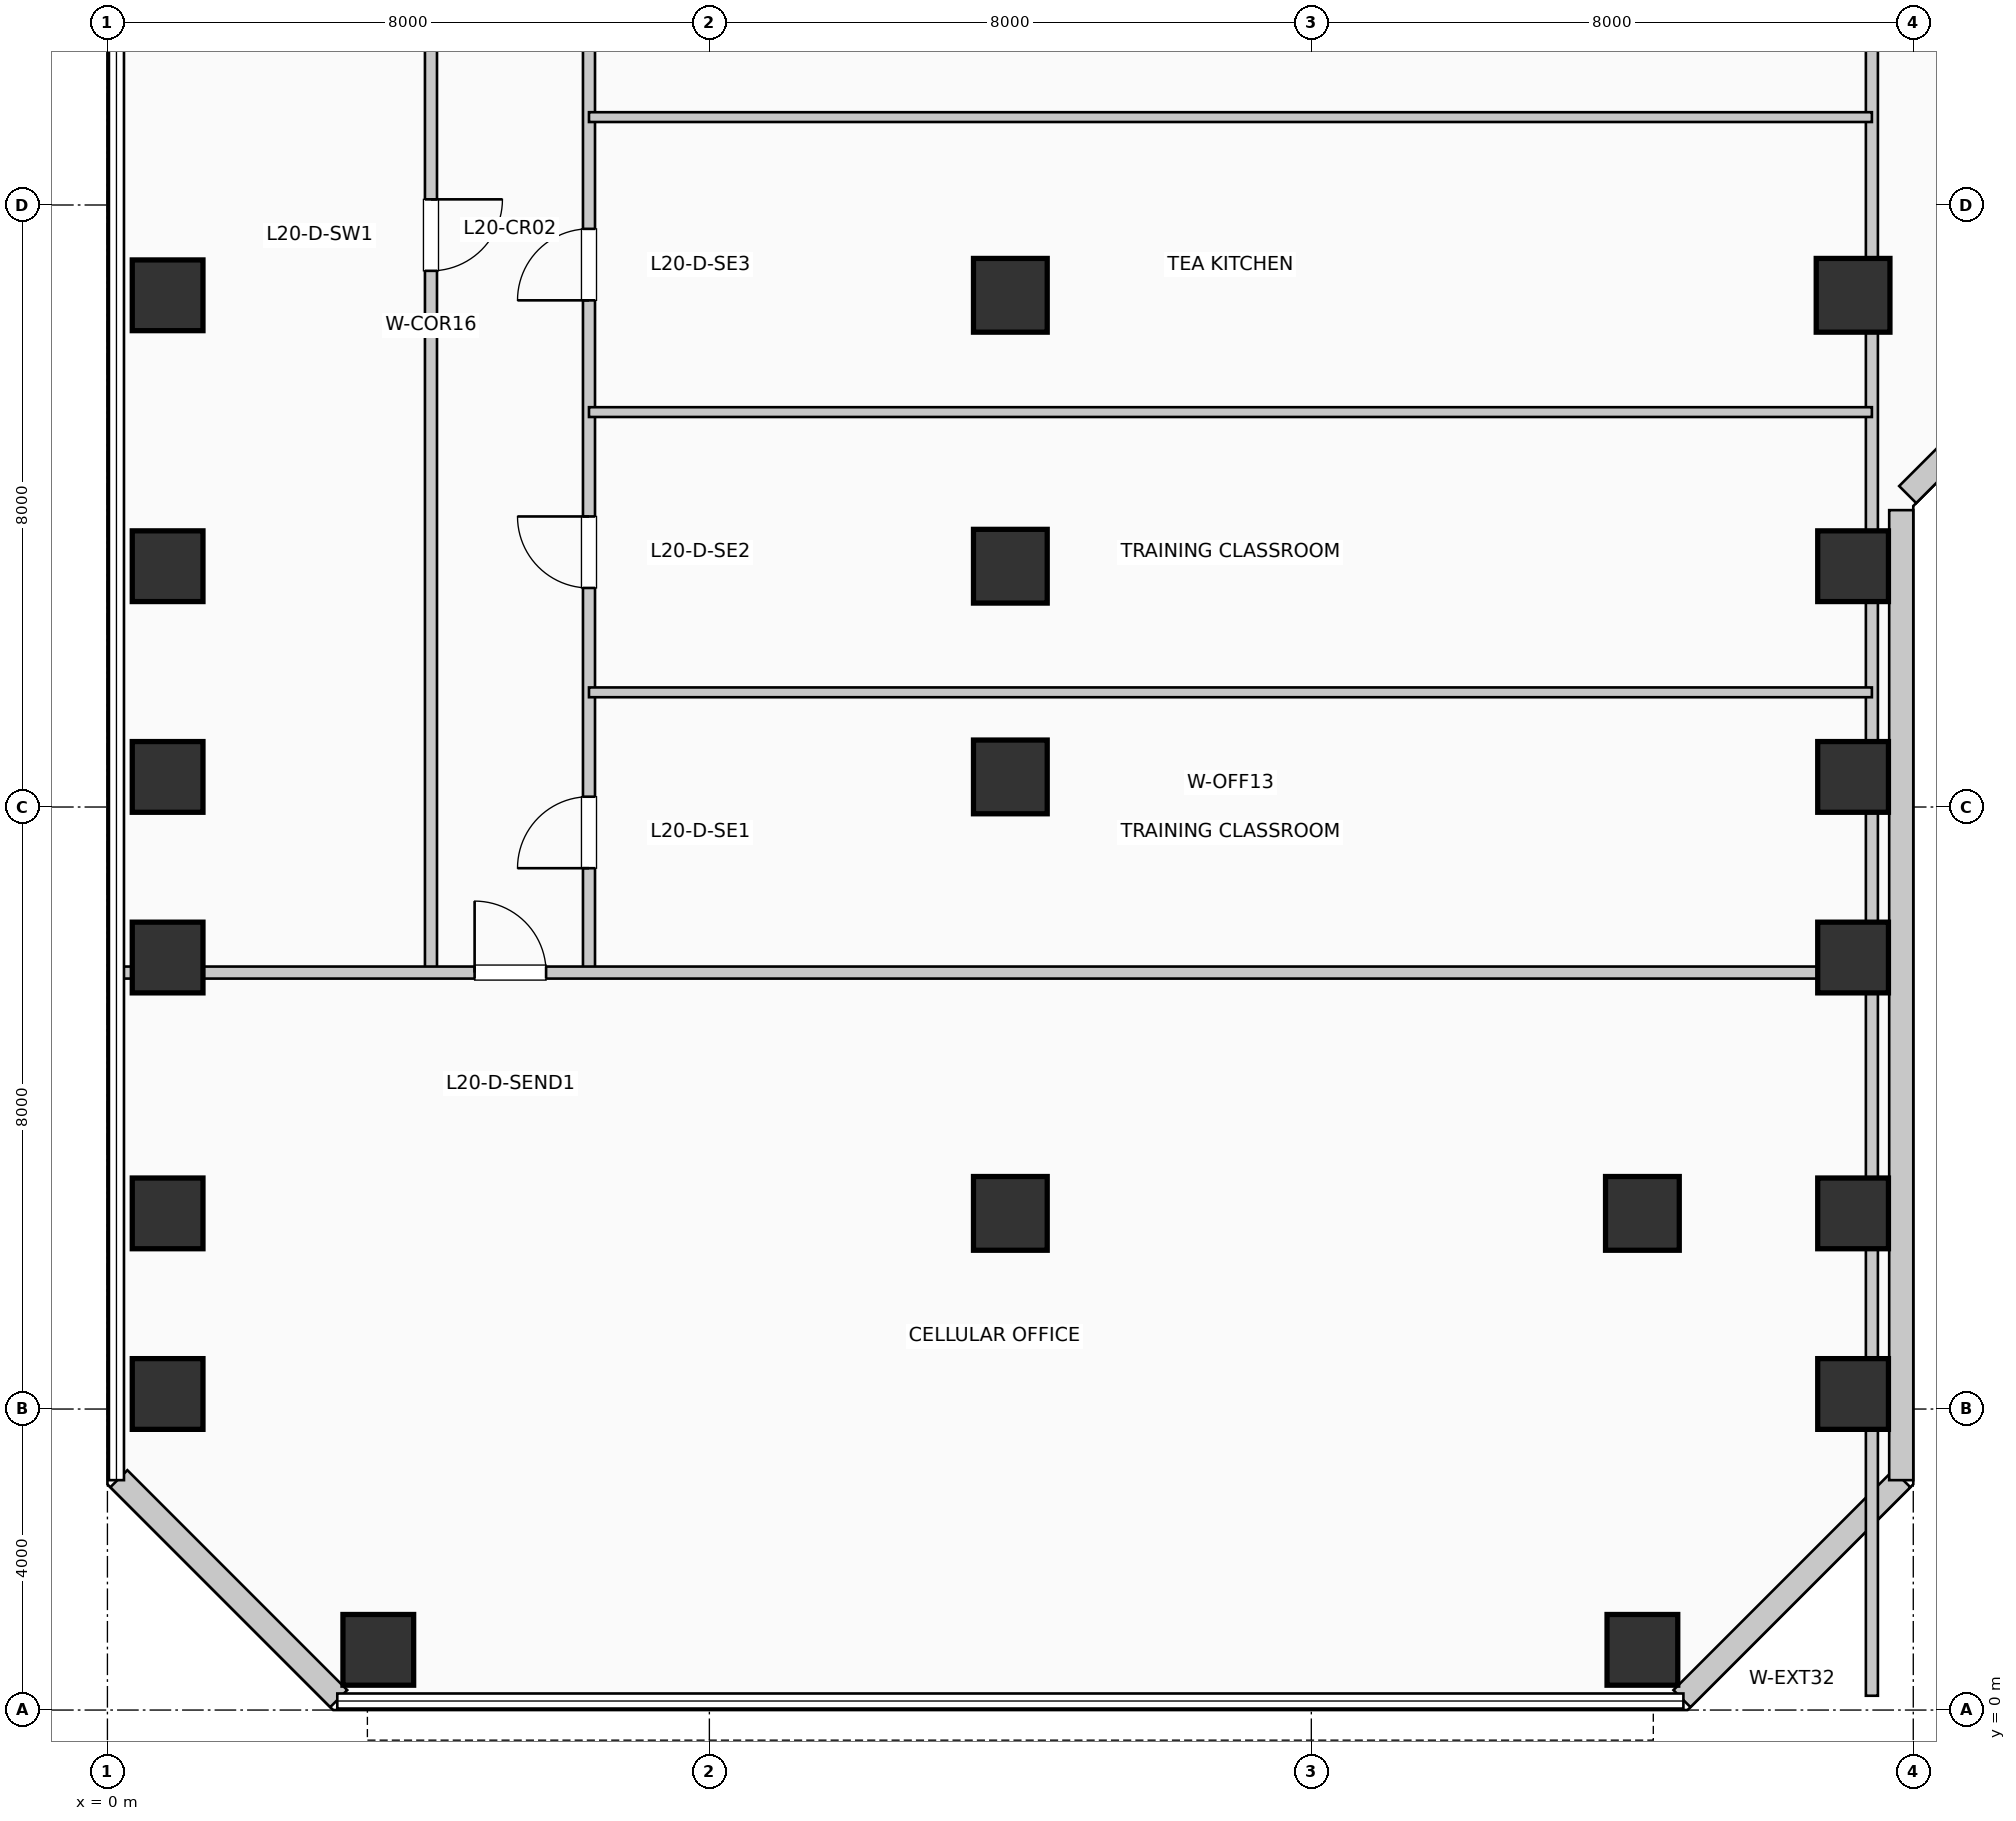
"""IFC4 building model, lengths in metres.
Left out: names, types, materials, properties, quantities, classifications, styles, units other than length and angle.
Written with IfcOpenShell. Run it as: python <this file> out.ifc"""

import sys

from ifc_helpers import new_model, si_unit, direction, frame, frame_2d, origin, origin_2d, place, context, subcontext, project, spatial, rectangle, extrude, element, fill, save


model = new_model("IFC4")
c1 = context("Model", 3, precision=1e-05, world=origin(), true_north=direction((0.0, 1.0)))
c2 = subcontext(c1, "Body", "Model", "MODEL_VIEW")
j1 = project(units=[si_unit("LENGTHUNIT", "METRE"), si_unit("PLANEANGLEUNIT", "RADIAN")], contexts=[c1])
p1 = place(None, origin())
s1 = spatial("IfcSite", under=j1, at=p1, CompositionType="ELEMENT")
p2 = place(p1, origin())
s2 = spatial("IfcBuilding", under=s1, at=p2, CompositionType="ELEMENT")
p3 = place(p2, frame((0.0, 0.0, 85.8)))
s3 = spatial("IfcBuildingStorey", under=s2, at=p3, CompositionType="ELEMENT", Elevation=85.8)
for number, where, z_axis, x_axis in (
    (1, (0.8, 4.2, 0.0), (0.0, 0.0, 1.0), (1.0, 0.0, 0.0)),
    (2, (0.8, 6.6, 0.0), (0.0, 0.0, 1.0), (1.0, 0.0, 0.0)),
    (3, (0.8, 10.0, 0.0), (0.0, 0.0, 1.0), (1.0, 0.0, 0.0)),
    (4, (0.8, 12.4, 0.0), (0.0, 0.0, 1.0), (1.0, 0.0, 0.0)),
    (5, (0.8, 15.2, 0.0), (0.0, 0.0, 1.0), (1.0, 0.0, 0.0)),
    (6, (0.8, 18.8, 0.0), (0.0, 0.0, 1.0), (1.0, 0.0, 0.0)),
    (7, (3.6, 0.8, 0.0), (0.0, 0.0, 1.0), (1.0, 0.0, 0.0)),
):
    element("IfcColumn", number, at=place(p3, frame(where, z_axis=z_axis, x_axis=x_axis)), inside=s3, PredefinedType="COLUMN", context=c2, shape_type="SweptSolid", body=[
        extrude(rectangle(XDim=0.94, YDim=0.94, at=origin_2d()), origin(), (0.0, 0.0, 1.0), 3.96),
    ])
for number, where, z_axis, x_axis in (
    (8, (12.0, 6.6, 0.0), (0.0, 0.0, 1.0), (1.0, 0.0, 0.0)),
    (9, (12.0, 12.4, 0.0), (0.0, 0.0, 1.0), (1.0, 0.0, 0.0)),
    (10, (12.0, 15.2, 0.0), (0.0, 0.0, 1.0), (1.0, 0.0, 0.0)),
    (11, (12.0, 18.8, 0.0), (0.0, 0.0, 1.0), (1.0, 0.0, 0.0)),
):
    element("IfcColumn", number, at=place(p3, frame(where, z_axis=z_axis, x_axis=x_axis)), inside=s3, PredefinedType="COLUMN", context=c2, shape_type="SweptSolid", body=[
        extrude(rectangle(XDim=0.98, YDim=0.98, at=origin_2d()), origin(), (0.0, 0.0, 1.0), 3.96),
    ])
p4 = place(p3, frame((20.4, 0.8, 0.0), z_axis=(0.0, 0.0, 1.0), x_axis=(1.0, 0.0, 0.0)))
e12 = element("IfcColumn", 12, at=p4, inside=s3, PredefinedType="COLUMN", context=c2, shape_type="SweptSolid", body=[
    extrude(rectangle(XDim=0.94, YDim=0.94, at=origin_2d()), origin(), (0.0, 0.0, 1.0), 3.96),
])
p5 = place(p3, frame((20.4, 6.6, 0.0), z_axis=(0.0, 0.0, 1.0), x_axis=(1.0, 0.0, 0.0)))
e13 = element("IfcColumn", 13, at=p5, inside=s3, PredefinedType="COLUMN", context=c2, shape_type="SweptSolid", body=[
    extrude(rectangle(XDim=0.98, YDim=0.98, at=origin_2d()), origin(), (0.0, 0.0, 1.0), 3.96),
])
for number, where, z_axis, x_axis in (
    (14, (23.2, 4.2, 0.0), (0.0, 0.0, 1.0), (1.0, 0.0, 0.0)),
    (15, (23.2, 6.6, 0.0), (0.0, 0.0, 1.0), (1.0, 0.0, 0.0)),
    (16, (23.2, 10.0, 0.0), (0.0, 0.0, 1.0), (1.0, 0.0, 0.0)),
    (17, (23.2, 12.4, 0.0), (0.0, 0.0, 1.0), (1.0, 0.0, 0.0)),
    (18, (23.2, 15.2, 0.0), (0.0, 0.0, 1.0), (1.0, 0.0, 0.0)),
):
    element("IfcColumn", number, at=place(p3, frame(where, z_axis=z_axis, x_axis=x_axis)), inside=s3, PredefinedType="COLUMN", context=c2, shape_type="SweptSolid", body=[
        extrude(rectangle(XDim=0.94, YDim=0.94, at=origin_2d()), origin(), (0.0, 0.0, 1.0), 3.96),
    ])
p6 = place(p3, frame((23.2, 18.8, 0.0), z_axis=(0.0, 0.0, 1.0), x_axis=(1.0, 0.0, 0.0)))
e19 = element("IfcColumn", 19, at=p6, inside=s3, PredefinedType="COLUMN", context=c2, shape_type="SweptSolid", body=[
    extrude(rectangle(XDim=0.98, YDim=0.98, at=origin_2d()), origin(), (0.0, 0.0, 1.0), 3.96),
])
p7 = place(p3, frame((20.926, 0.152, 0.0), z_axis=(0.0, 0.0, 1.0), x_axis=(0.707106781187, 0.707106781187, 0.0)))
e20 = element("IfcWall", 20, at=p7, inside=s3, PredefinedType="SOLIDWALL", context=c2, shape_type="SweptSolid", body=[
    extrude(rectangle(XDim=4.133, YDim=0.32, at=frame_2d((2.066, 0.0))), origin(), (0.0, 0.0, 1.0), 3.71),
])
p8 = place(p3, frame((23.84, 3.055, 0.0), z_axis=(0.0, 0.0, 1.0), x_axis=(0.0, 1.0, 0.0)))
e21 = element("IfcWall", 21, at=p8, inside=s3, PredefinedType="SOLIDWALL", context=c2, shape_type="SweptSolid", body=[
    extrude(rectangle(XDim=12.89, YDim=0.32, at=frame_2d((6.445, 0.0))), origin(), (0.0, 0.0, 1.0), 3.71),
])
p9 = place(p3, frame((23.926, 16.152, 0.0), z_axis=(0.0, 0.0, 1.0), x_axis=(0.707106781187, 0.707106781187, 0.0)))
e22 = element("IfcWall", 22, at=p9, inside=s3, PredefinedType="SOLIDWALL", context=c2, shape_type="SweptSolid", body=[
    extrude(rectangle(XDim=2.718, YDim=0.32, at=frame_2d((1.359, 0.0))), origin(), (0.0, 0.0, 1.0), 3.71),
])
p10 = place(p3, frame((0.152, 3.074, 0.0), z_axis=(0.0, 0.0, 1.0), x_axis=(0.707106781187, -0.707106781187, 0.0)))
e23 = element("IfcWall", 23, at=p10, inside=s3, PredefinedType="SOLIDWALL", context=c2, shape_type="SweptSolid", body=[
    extrude(rectangle(XDim=4.133, YDim=0.32, at=frame_2d((2.066, 0.0))), origin(), (0.0, 0.0, 1.0), 3.71),
])
p11 = place(p3, frame((4.3, 9.8, 0.0), z_axis=(0.0, 0.0, 1.0), x_axis=(0.0, 1.0, 0.0)))
e24 = element("IfcWall", 24, at=p11, inside=s3, PredefinedType="PARTITIONING", context=c2, shape_type="SweptSolid", body=[
    extrude(rectangle(XDim=19.6, YDim=0.16, at=frame_2d((9.8, 0.0))), origin(), (0.0, 0.0, 1.0), 3.71),
])
p12 = place(p11, frame((10.275, 0.0, 0.0), z_axis=(0.0, 0.0, 1.0), x_axis=(-1.0, 0.0, 0.0)))
e25 = element("IfcOpeningElement", 25, at=p12, cuts=e24, PredefinedType="OPENING", context=c2, shape_type="SweptSolid", body=[
    extrude(rectangle(XDim=0.95, YDim=2.15, at=frame_2d((0.475, 1.075))), frame((0.0, 0.09, 0.0), z_axis=(0.0, -1.0, 0.0), x_axis=(1.0, 0.0, 0.0)), (0.0, 0.0, 1.0), 0.18),
])
p13 = place(p3, frame((6.4, 9.8, 0.0), z_axis=(0.0, 0.0, 1.0), x_axis=(0.0, 1.0, 0.0)))
e26 = element("IfcWall", 26, at=p13, inside=s3, PredefinedType="PARTITIONING", context=c2, shape_type="SweptSolid", body=[
    extrude(rectangle(XDim=19.6, YDim=0.16, at=frame_2d((9.8, 0.0))), origin(), (0.0, 0.0, 1.0), 3.71),
])
p14 = place(p13, frame((1.387, 0.0, 0.0)))
e27 = element("IfcOpeningElement", 27, at=p14, cuts=e26, PredefinedType="OPENING", context=c2, shape_type="SweptSolid", body=[
    extrude(rectangle(XDim=0.95, YDim=2.15, at=frame_2d((0.475, 1.075))), frame((0.0, 0.09, 0.0), z_axis=(0.0, -1.0, 0.0), x_axis=(1.0, 0.0, 0.0)), (0.0, 0.0, 1.0), 0.18),
])
p15 = place(p13, frame((5.111, 0.0, 0.0)))
e28 = element("IfcOpeningElement", 28, at=p15, cuts=e26, PredefinedType="OPENING", context=c2, shape_type="SweptSolid", body=[
    extrude(rectangle(XDim=0.95, YDim=2.15, at=frame_2d((0.475, 1.075))), frame((0.0, 0.09, 0.0), z_axis=(0.0, -1.0, 0.0), x_axis=(1.0, 0.0, 0.0)), (0.0, 0.0, 1.0), 0.18),
])
p16 = place(p13, frame((8.933, 0.0, 0.0)))
e29 = element("IfcOpeningElement", 29, at=p16, cuts=e26, PredefinedType="OPENING", context=c2, shape_type="SweptSolid", body=[
    extrude(rectangle(XDim=0.95, YDim=2.15, at=frame_2d((0.475, 1.075))), frame((0.0, 0.09, 0.0), z_axis=(0.0, -1.0, 0.0), x_axis=(1.0, 0.0, 0.0)), (0.0, 0.0, 1.0), 0.18),
])
p17 = place(p13, frame((12.951, 0.0, 0.0)))
e30 = element("IfcOpeningElement", 30, at=p17, cuts=e26, PredefinedType="OPENING", context=c2, shape_type="SweptSolid", body=[
    extrude(rectangle(XDim=0.95, YDim=2.15, at=frame_2d((0.475, 1.075))), frame((0.0, 0.09, 0.0), z_axis=(0.0, -1.0, 0.0), x_axis=(1.0, 0.0, 0.0)), (0.0, 0.0, 1.0), 0.18),
])
p18 = place(p13, frame((17.067, 0.0, 0.0)))
e31 = element("IfcOpeningElement", 31, at=p18, cuts=e26, PredefinedType="OPENING", context=c2, shape_type="SweptSolid", body=[
    extrude(rectangle(XDim=0.95, YDim=2.15, at=frame_2d((0.475, 1.075))), frame((0.0, 0.09, 0.0), z_axis=(0.0, -1.0, 0.0), x_axis=(1.0, 0.0, 0.0)), (0.0, 0.0, 1.0), 0.18),
])
p19 = place(p3, frame((0.19, 9.8, 0.0), z_axis=(0.0, 0.0, 1.0), x_axis=(1.0, 0.0, 0.0)))
e32 = element("IfcWall", 32, at=p19, inside=s3, PredefinedType="PARTITIONING", context=c2, shape_type="SweptSolid", body=[
    extrude(rectangle(XDim=23.26, YDim=0.16, at=frame_2d((11.63, 0.0))), origin(), (0.0, 0.0, 1.0), 2.995),
])
p20 = place(p19, frame((4.69, 0.0, 0.0)))
e33 = element("IfcOpeningElement", 33, at=p20, cuts=e32, PredefinedType="OPENING", context=c2, shape_type="SweptSolid", body=[
    extrude(rectangle(XDim=0.95, YDim=2.15, at=frame_2d((0.475, 1.075))), frame((0.0, 0.09, 0.0), z_axis=(0.0, -1.0, 0.0), x_axis=(1.0, 0.0, 0.0)), (0.0, 0.0, 1.0), 0.18),
])
p21 = place(p3, frame((23.45, 0.19, 0.0), z_axis=(0.0, 0.0, 1.0), x_axis=(0.0, 1.0, 0.0)))
e34 = element("IfcWall", 34, at=p21, inside=s3, PredefinedType="PARTITIONING", context=c2, shape_type="SweptSolid", body=[
    extrude(rectangle(XDim=29.21, YDim=0.16, at=frame_2d((14.605, 0.0))), origin(), (0.0, 0.0, 1.0), 2.995),
])
for number, where, z_axis, x_axis in (
    (35, (6.4, 13.524, 0.0), (0.0, 0.0, 1.0), (1.0, 0.0, 0.0)),
    (36, (6.4, 17.248, 0.0), (0.0, 0.0, 1.0), (1.0, 0.0, 0.0)),
    (37, (6.4, 21.168, 0.0), (0.0, 0.0, 1.0), (1.0, 0.0, 0.0)),
):
    element("IfcWall", number, at=place(p3, frame(where, z_axis=z_axis, x_axis=x_axis)), inside=s3, PredefinedType="PARTITIONING", context=c2, shape_type="SweptSolid", body=[
        extrude(rectangle(XDim=17.05, YDim=0.13, at=frame_2d((8.525, 0.0))), origin(), (0.0, 0.0, 1.0), 3.71),
    ])
p22 = place(p20, origin())
e38 = element("IfcDoor", 38, at=p22, inside=s3, OperationType="SINGLE_SWING_LEFT", PredefinedType="DOOR", context=c2, shape_type="SweptSolid", body=[
    extrude(rectangle(XDim=0.95, YDim=2.15, at=frame_2d((0.475, 1.075))), frame((0.0, 0.025, 0.0), z_axis=(0.0, -1.0, 0.0), x_axis=(1.0, 0.0, 0.0)), (0.0, 0.0, 1.0), 0.05),
])
fill(e33, e38)
p23 = place(p12, origin())
e39 = element("IfcDoor", 39, at=p23, inside=s3, OperationType="SINGLE_SWING_RIGHT", PredefinedType="DOOR", context=c2, shape_type="SweptSolid", body=[
    extrude(rectangle(XDim=0.95, YDim=2.15, at=frame_2d((0.475, 1.075))), frame((0.0, 0.025, 0.0), z_axis=(0.0, -1.0, 0.0), x_axis=(1.0, 0.0, 0.0)), (0.0, 0.0, 1.0), 0.05),
])
fill(e25, e39)
p24 = place(p14, origin())
e40 = element("IfcDoor", 40, at=p24, inside=s3, OperationType="SINGLE_SWING_LEFT", PredefinedType="DOOR", context=c2, shape_type="SweptSolid", body=[
    extrude(rectangle(XDim=0.95, YDim=2.15, at=frame_2d((0.475, 1.075))), frame((0.0, 0.025, 0.0), z_axis=(0.0, -1.0, 0.0), x_axis=(1.0, 0.0, 0.0)), (0.0, 0.0, 1.0), 0.05),
])
fill(e27, e40)
p25 = place(p15, origin())
e41 = element("IfcDoor", 41, at=p25, inside=s3, OperationType="SINGLE_SWING_RIGHT", PredefinedType="DOOR", context=c2, shape_type="SweptSolid", body=[
    extrude(rectangle(XDim=0.95, YDim=2.15, at=frame_2d((0.475, 1.075))), frame((0.0, 0.025, 0.0), z_axis=(0.0, -1.0, 0.0), x_axis=(1.0, 0.0, 0.0)), (0.0, 0.0, 1.0), 0.05),
])
fill(e28, e41)
p26 = place(p16, origin())
e42 = element("IfcDoor", 42, at=p26, inside=s3, OperationType="SINGLE_SWING_LEFT", PredefinedType="DOOR", context=c2, shape_type="SweptSolid", body=[
    extrude(rectangle(XDim=0.95, YDim=2.15, at=frame_2d((0.475, 1.075))), frame((0.0, 0.025, 0.0), z_axis=(0.0, -1.0, 0.0), x_axis=(1.0, 0.0, 0.0)), (0.0, 0.0, 1.0), 0.05),
])
fill(e29, e42)
save(model, sys.argv[1])
